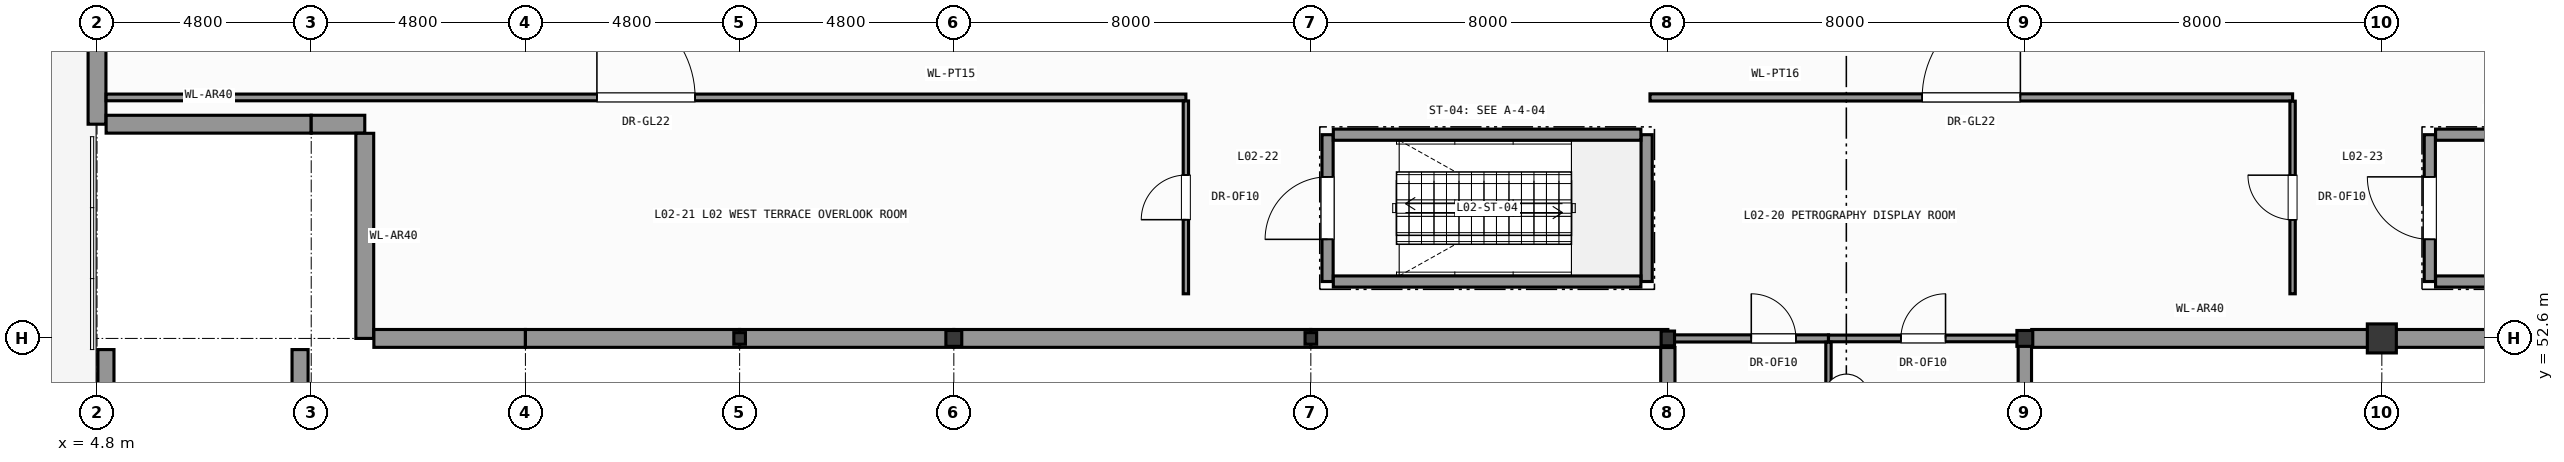
"""IFC4 building model, lengths in metres.
Left out: names, types, materials, properties, quantities, classifications, styles, units other than length and angle.
Written with IfcOpenShell. Run it as: python <this file> out.ifc"""

import sys

from ifc_helpers import new_model, si_unit, direction, frame, frame_2d, origin, origin_2d, place, context, subcontext, project, spatial, rectangle, hollow_rectangle, hollow_circle, i_section, extrude, element, fill, save


model = new_model("IFC4")
c1 = context("Model", 3, precision=1e-05, world=origin(), true_north=direction((0.0, 1.0)))
c2 = subcontext(c1, "Body", "Model", "MODEL_VIEW")
j1 = project(units=[si_unit("LENGTHUNIT", "METRE"), si_unit("PLANEANGLEUNIT", "RADIAN")], contexts=[c1])
p1 = place(None, origin())
s1 = spatial("IfcSite", under=j1, at=p1, CompositionType="ELEMENT")
p2 = place(p1, origin())
s2 = spatial("IfcBuilding", under=s1, at=p2, CompositionType="ELEMENT")
p3 = place(p2, frame((0.0, 0.0, 7.8)))
s3 = spatial("IfcBuildingStorey", under=s2, at=p3, CompositionType="ELEMENT", Elevation=7.8)
p4 = place(p3, frame((19.2, 52.6, 0.0), z_axis=(0.0, 0.0, 1.0), x_axis=(1.0, 0.0, 0.0)))
e1 = element("IfcColumn", 1, at=p4, inside=s3, PredefinedType="COLUMN", context=c2, shape_type="SweptSolid", body=[
    extrude(hollow_rectangle(XDim=0.26, YDim=0.26, WallThickness=0.012, InnerFilletRadius=0.012, OuterFilletRadius=0.025, at=origin_2d()), origin(), (0.0, 0.0, 1.0), 5.4),
])
p5 = place(p3, frame((24.0, 52.6, 0.0), z_axis=(0.0, 0.0, 1.0), x_axis=(1.0, 0.0, 0.0)))
e2 = element("IfcColumn", 2, at=p5, inside=s3, PredefinedType="COLUMN", context=c2, shape_type="SweptSolid", body=[
    extrude(hollow_circle(Radius=0.178, WallThickness=0.016, at=origin_2d()), origin(), (0.0, 0.0, 1.0), 5.4),
])
p6 = place(p3, frame((32.0, 52.6, 0.0), z_axis=(0.0, 0.0, 1.0), x_axis=(1.0, 0.0, 0.0)))
e3 = element("IfcColumn", 3, at=p6, inside=s3, PredefinedType="COLUMN", context=c2, shape_type="SweptSolid", body=[
    extrude(hollow_rectangle(XDim=0.26, YDim=0.26, WallThickness=0.012, InnerFilletRadius=0.012, OuterFilletRadius=0.025, at=origin_2d()), origin(), (0.0, 0.0, 1.0), 5.4),
])
p7 = place(p3, frame((40.0, 52.6, 0.0), z_axis=(0.0, 0.0, 1.0), x_axis=(1.0, 0.0, 0.0)))
e4 = element("IfcColumn", 4, at=p7, inside=s3, PredefinedType="COLUMN", context=c2, shape_type="SweptSolid", body=[
    extrude(i_section(OverallWidth=0.3, OverallDepth=0.33, WebThickness=0.01, FlangeThickness=0.017, FilletRadius=0.027, at=origin_2d()), origin(), (0.0, 0.0, 1.0), 5.4),
])
p8 = place(p3, frame((48.0, 52.6, 0.0), z_axis=(0.0, 0.0, 1.0), x_axis=(1.0, 0.0, 0.0)))
e5 = element("IfcColumn", 5, at=p8, inside=s3, PredefinedType="COLUMN", context=c2, shape_type="SweptSolid", body=[
    extrude(hollow_circle(Radius=0.178, WallThickness=0.016, at=origin_2d()), origin(), (0.0, 0.0, 1.0), 5.4),
])
p9 = place(p3, frame((56.0, 52.6, 0.0), z_axis=(0.0, 0.0, 1.0), x_axis=(1.0, 0.0, 0.0)))
e6 = element("IfcColumn", 6, at=p9, inside=s3, PredefinedType="PILASTER", context=c2, shape_type="SweptSolid", body=[
    extrude(rectangle(XDim=0.65, YDim=0.65, at=origin_2d()), origin(), (0.0, 0.0, 1.0), 5.4),
])
p10 = place(p3, frame((48.0, 52.6, 0.0), z_axis=(0.0, 0.0, 1.0), x_axis=(0.0, -1.0, 0.0)))
e7 = element("IfcWall", 7, at=p10, inside=s3, PredefinedType="SOLIDWALL", context=c2, shape_type="SweptSolid", body=[
    extrude(rectangle(XDim=7.0, YDim=0.3, at=frame_2d((3.5, 0.0))), origin(), (0.0, 0.0, 1.0), 4.635),
])
p11 = place(p10, frame((1.658, 0.0, 0.95)))
e8 = element("IfcOpeningElement", 8, at=p11, cuts=e7, PredefinedType="OPENING", context=c2, shape_type="SweptSolid", body=[
    extrude(rectangle(XDim=1.35, YDim=2.45, at=frame_2d((0.675, 1.225))), frame((0.0, 0.16, 0.0), z_axis=(0.0, -1.0, 0.0), x_axis=(1.0, 0.0, 0.0)), (0.0, 0.0, 1.0), 0.32),
])
p12 = place(p10, frame((3.992, 0.0, 0.95)))
e9 = element("IfcOpeningElement", 9, at=p12, cuts=e7, PredefinedType="OPENING", context=c2, shape_type="SweptSolid", body=[
    extrude(rectangle(XDim=1.35, YDim=2.45, at=frame_2d((0.675, 1.225))), frame((0.0, 0.16, 0.0), z_axis=(0.0, -1.0, 0.0), x_axis=(1.0, 0.0, 0.0)), (0.0, 0.0, 1.0), 0.32),
])
p13 = place(p3, frame((56.0, 52.6, 0.0), z_axis=(0.0, 0.0, 1.0), x_axis=(-1.0, 0.0, 0.0)))
e10 = element("IfcWall", 10, at=p13, inside=s3, PredefinedType="SOLIDWALL", context=c2, shape_type="SweptSolid", body=[
    extrude(rectangle(XDim=7.846, YDim=0.4, at=frame_2d((3.923, 0.0))), origin(), (0.0, 0.0, 1.0), 5.15),
])
p14 = place(p3, frame((70.0, 52.6, 0.0), z_axis=(0.0, 0.0, 1.0), x_axis=(-1.0, 0.0, 0.0)))
e11 = element("IfcWall", 11, at=p14, inside=s3, PredefinedType="SOLIDWALL", context=c2, shape_type="SweptSolid", body=[
    extrude(rectangle(XDim=14.0, YDim=0.4, at=frame_2d((7.0, 0.0))), origin(), (0.0, 0.0, 1.0), 5.15),
])
p15 = place(p3, frame((4.8, 57.4, 0.0), z_axis=(0.0, 0.0, 1.0), x_axis=(0.0, 1.0, 0.0)))
e12 = element("IfcWall", 12, at=p15, inside=s3, PredefinedType="SOLIDWALL", context=c2, shape_type="SweptSolid", body=[
    extrude(rectangle(XDim=2.2, YDim=0.4, at=frame_2d((1.1, 0.0))), origin(), (0.0, 0.0, 1.0), 5.15),
])
p16 = place(p3, frame((9.6, 57.4, 0.0), z_axis=(0.0, 0.0, 1.0), x_axis=(-1.0, 0.0, 0.0)))
e13 = element("IfcWall", 13, at=p16, inside=s3, PredefinedType="SOLIDWALL", context=c2, shape_type="SweptSolid", body=[
    extrude(rectangle(XDim=4.596, YDim=0.4, at=frame_2d((2.298, 0.0))), origin(), (0.0, 0.0, 1.0), 5.15),
])
p17 = place(p3, frame((10.8, 57.4, 0.0), z_axis=(0.0, 0.0, 1.0), x_axis=(-1.0, 0.0, 0.0)))
e14 = element("IfcWall", 14, at=p17, inside=s3, PredefinedType="SOLIDWALL", context=c2, shape_type="SweptSolid", body=[
    extrude(rectangle(XDim=1.2, YDim=0.4, at=frame_2d((0.6, 0.0))), origin(), (0.0, 0.0, 1.0), 5.15),
])
p18 = place(p3, frame((10.8, 52.6, 0.0), z_axis=(0.0, 0.0, 1.0), x_axis=(0.0, 1.0, 0.0)))
e15 = element("IfcWall", 15, at=p18, inside=s3, PredefinedType="SOLIDWALL", context=c2, shape_type="SweptSolid", body=[
    extrude(rectangle(XDim=4.596, YDim=0.4, at=frame_2d((2.298, 0.0))), origin(), (0.0, 0.0, 1.0), 5.15),
])
p19 = place(p3, frame((14.4, 52.6, 0.0), z_axis=(0.0, 0.0, 1.0), x_axis=(-1.0, 0.0, 0.0)))
e16 = element("IfcWall", 16, at=p19, inside=s3, PredefinedType="SOLIDWALL", context=c2, shape_type="SweptSolid", body=[
    extrude(rectangle(XDim=3.396, YDim=0.4, at=frame_2d((1.698, 0.0))), origin(), (0.0, 0.0, 1.0), 5.15),
])
for number, where, z_axis, x_axis in (
    (17, (19.2, 52.6, 0.0), (0.0, 0.0, 1.0), (-1.0, 0.0, 0.0)),
    (18, (24.0, 52.6, 0.0), (0.0, 0.0, 1.0), (-1.0, 0.0, 0.0)),
):
    element("IfcWall", number, at=place(p3, frame(where, z_axis=z_axis, x_axis=x_axis)), inside=s3, PredefinedType="SOLIDWALL", context=c2, shape_type="SweptSolid", body=[
        extrude(rectangle(XDim=4.8, YDim=0.4, at=frame_2d((2.4, 0.0))), origin(), (0.0, 0.0, 1.0), 5.15),
    ])
for number, where, z_axis, x_axis in (
    (19, (32.0, 52.6, 0.0), (0.0, 0.0, 1.0), (-1.0, 0.0, 0.0)),
    (20, (40.0, 52.6, 0.0), (0.0, 0.0, 1.0), (-1.0, 0.0, 0.0)),
):
    element("IfcWall", number, at=place(p3, frame(where, z_axis=z_axis, x_axis=x_axis)), inside=s3, PredefinedType="SOLIDWALL", context=c2, shape_type="SweptSolid", body=[
        extrude(rectangle(XDim=8.0, YDim=0.4, at=frame_2d((4.0, 0.0))), origin(), (0.0, 0.0, 1.0), 5.15),
    ])
p20 = place(p3, frame((40.0, 45.6, 0.0), z_axis=(0.0, 0.0, 1.0), x_axis=(0.0, 1.0, 0.0)))
e21 = element("IfcWall", 21, at=p20, inside=s3, PredefinedType="SOLIDWALL", context=c2, shape_type="SweptSolid", body=[
    extrude(rectangle(XDim=6.796, YDim=0.32, at=frame_2d((3.398, 0.0))), origin(), (0.0, 0.0, 1.0), 4.635),
])
p21 = place(p20, frame((2.373, 0.0, 0.95)))
e22 = element("IfcOpeningElement", 22, at=p21, cuts=e21, PredefinedType="OPENING", context=c2, shape_type="SweptSolid", body=[
    extrude(rectangle(XDim=2.05, YDim=3.29, at=frame_2d((1.025, 1.645))), frame((0.0, 0.17, 0.0), z_axis=(0.0, -1.0, 0.0), x_axis=(1.0, 0.0, 0.0)), (0.0, 0.0, 1.0), 0.34),
])
for number, where, z_axis, x_axis in (
    (23, (5.0, 29.91, -7.8), (0.0, 0.0, 1.0), (0.0, 1.0, 0.0)),
    (24, (9.35, 29.91, -7.8), (0.0, 0.0, 1.0), (0.0, 1.0, 0.0)),
):
    element("IfcWall", number, at=place(p3, frame(where, z_axis=z_axis, x_axis=x_axis)), inside=s3, PredefinedType="SOLIDWALL", context=c2, shape_type="SweptSolid", body=[
        extrude(rectangle(XDim=22.44, YDim=0.36, at=frame_2d((11.22, 0.0))), origin(), (0.0, 0.0, 1.0), 12.98),
    ])
p22 = place(p2, frame((0.0, 0.0, 13.2)))
s4 = spatial("IfcBuildingStorey", under=s2, at=p22, CompositionType="ELEMENT", Elevation=13.2)
for number, where, z_axis, x_axis in (
    (25, (9.8, 41.46, -13.2), (0.0, 0.0, 1.0), (0.0, 1.0, 0.0)),
    (26, (14.15, 41.46, -13.2), (0.0, 0.0, 1.0), (0.0, 1.0, 0.0)),
):
    element("IfcWall", number, at=place(p22, frame(where, z_axis=z_axis, x_axis=x_axis)), inside=s4, PredefinedType="SOLIDWALL", context=c2, shape_type="SweptSolid", body=[
        extrude(rectangle(XDim=10.89, YDim=0.36, at=frame_2d((5.445, 0.0))), origin(), (0.0, 0.0, 1.0), 17.78),
    ])
p23 = place(p3, frame((57.075, 53.875, 0.0), z_axis=(0.0, 0.0, 1.0), x_axis=(0.0, 1.0, 0.0)))
e27 = element("IfcWall", 27, at=p23, inside=s3, PredefinedType="SHEAR", context=c2, shape_type="SweptSolid", body=[
    extrude(rectangle(XDim=3.29, YDim=0.25, at=frame_2d((1.645, 0.0))), origin(), (0.0, 0.0, 1.0), 5.15),
])
p24 = place(p23, frame((0.945, 0.0, 0.0)))
e28 = element("IfcOpeningElement", 28, at=p24, cuts=e27, PredefinedType="OPENING", context=c2, shape_type="SweptSolid", body=[
    extrude(rectangle(XDim=1.4, YDim=2.2, at=frame_2d((0.7, 1.1))), frame((0.0, 0.135, 0.0), z_axis=(0.0, -1.0, 0.0), x_axis=(1.0, 0.0, 0.0)), (0.0, 0.0, 1.0), 0.27),
])
for number, where, z_axis, x_axis in (
    (29, (57.204, 53.875, 0.0), (0.0, 0.0, 1.0), (1.0, 0.0, 0.0)),
    (30, (57.204, 57.165, 0.0), (0.0, 0.0, 1.0), (1.0, 0.0, 0.0)),
):
    element("IfcWall", number, at=place(p3, frame(where, z_axis=z_axis, x_axis=x_axis)), inside=s3, PredefinedType="SHEAR", context=c2, shape_type="SweptSolid", body=[
        extrude(rectangle(XDim=7.192, YDim=0.25, at=frame_2d((3.596, 0.0))), origin(), (0.0, 0.0, 1.0), 5.15),
    ])
p25 = place(p3, frame((32.375, 53.875, 0.0), z_axis=(0.0, 0.0, 1.0), x_axis=(0.0, 1.0, 0.0)))
e31 = element("IfcWall", 31, at=p25, inside=s3, PredefinedType="SHEAR", context=c2, shape_type="SweptSolid", body=[
    extrude(rectangle(XDim=3.29, YDim=0.25, at=frame_2d((1.645, 0.0))), origin(), (0.0, 0.0, 1.0), 5.15),
])
p26 = place(p25, frame((0.945, 0.0, 0.0)))
e32 = element("IfcOpeningElement", 32, at=p26, cuts=e31, PredefinedType="OPENING", context=c2, shape_type="SweptSolid", body=[
    extrude(rectangle(XDim=1.4, YDim=2.2, at=frame_2d((0.7, 1.1))), frame((0.0, 0.135, 0.0), z_axis=(0.0, -1.0, 0.0), x_axis=(1.0, 0.0, 0.0)), (0.0, 0.0, 1.0), 0.27),
])
p27 = place(p3, frame((39.525, 53.875, 0.0), z_axis=(0.0, 0.0, 1.0), x_axis=(0.0, 1.0, 0.0)))
e33 = element("IfcWall", 33, at=p27, inside=s3, PredefinedType="SHEAR", context=c2, shape_type="SweptSolid", body=[
    extrude(rectangle(XDim=3.29, YDim=0.25, at=frame_2d((1.645, 0.0))), origin(), (0.0, 0.0, 1.0), 5.15),
])
for number, where, z_axis, x_axis in (
    (34, (32.504, 53.875, 0.0), (0.0, 0.0, 1.0), (1.0, 0.0, 0.0)),
    (35, (32.504, 57.165, 0.0), (0.0, 0.0, 1.0), (1.0, 0.0, 0.0)),
):
    element("IfcWall", number, at=place(p3, frame(where, z_axis=z_axis, x_axis=x_axis)), inside=s3, PredefinedType="SHEAR", context=c2, shape_type="SweptSolid", body=[
        extrude(rectangle(XDim=6.892, YDim=0.25, at=frame_2d((3.446, 0.0))), origin(), (0.0, 0.0, 1.0), 5.15),
    ])
p28 = place(p3, frame((39.6, 58.0, 0.0), z_axis=(0.0, 0.0, 1.0), x_axis=(1.0, 0.0, 0.0)))
e36 = element("IfcWall", 36, at=p28, inside=s3, PredefinedType="PARTITIONING", context=c2, shape_type="SweptSolid", body=[
    extrude(rectangle(XDim=14.4, YDim=0.16, at=frame_2d((7.2, 0.0))), origin(), (0.0, 0.0, 1.0), 5.15),
])
p29 = place(p28, frame((6.1, 0.0, 0.0)))
e37 = element("IfcOpeningElement", 37, at=p29, cuts=e36, PredefinedType="OPENING", context=c2, shape_type="SweptSolid", body=[
    extrude(rectangle(XDim=2.2, YDim=2.6, at=frame_2d((1.1, 1.3))), frame((0.0, 0.09, 0.0), z_axis=(0.0, -1.0, 0.0), x_axis=(1.0, 0.0, 0.0)), (0.0, 0.0, 1.0), 0.18),
])
p30 = place(p3, frame((5.004, 58.0, 0.0), z_axis=(0.0, 0.0, 1.0), x_axis=(1.0, 0.0, 0.0)))
e38 = element("IfcWall", 38, at=p30, inside=s3, PredefinedType="PARTITIONING", context=c2, shape_type="SweptSolid", body=[
    extrude(rectangle(XDim=24.196, YDim=0.15, at=frame_2d((12.098, 0.0))), origin(), (0.0, 0.0, 1.0), 5.15),
])
p31 = place(p30, frame((10.998, 0.0, 0.0)))
e39 = element("IfcOpeningElement", 39, at=p31, cuts=e38, PredefinedType="OPENING", context=c2, shape_type="SweptSolid", body=[
    extrude(rectangle(XDim=2.2, YDim=2.6, at=frame_2d((1.1, 1.3))), frame((0.0, 0.085, 0.0), z_axis=(0.0, -1.0, 0.0), x_axis=(1.0, 0.0, 0.0)), (0.0, 0.0, 1.0), 0.17),
])
p32 = place(p3, frame((54.0, 53.6, 0.0), z_axis=(0.0, 0.0, 1.0), x_axis=(0.0, 1.0, 0.0)))
e40 = element("IfcWall", 40, at=p32, inside=s3, PredefinedType="PARTITIONING", context=c2, shape_type="SweptSolid", body=[
    extrude(rectangle(XDim=4.316, YDim=0.12, at=frame_2d((2.158, 0.0))), origin(), (0.0, 0.0, 1.0), 5.15),
])
p33 = place(p32, frame((1.658, 0.0, 0.0)))
e41 = element("IfcOpeningElement", 41, at=p33, cuts=e40, PredefinedType="OPENING", context=c2, shape_type="SweptSolid", body=[
    extrude(rectangle(XDim=1.0, YDim=2.15, at=frame_2d((0.5, 1.075))), frame((0.0, 0.07, 0.0), z_axis=(0.0, -1.0, 0.0), x_axis=(1.0, 0.0, 0.0)), (0.0, 0.0, 1.0), 0.14),
])
p34 = place(p3, frame((40.0, 52.6, 0.0), z_axis=(0.0, 0.0, 1.0), x_axis=(1.0, 0.0, 0.0)))
e42 = element("IfcWall", 42, at=p34, inside=s3, PredefinedType="PARTITIONING", context=c2, shape_type="SweptSolid", body=[
    extrude(rectangle(XDim=3.6, YDim=0.16, at=frame_2d((1.8, 0.0))), origin(), (0.0, 0.0, 1.0), 4.735),
])
p35 = place(p34, frame((1.87, 0.0, 0.0)))
e43 = element("IfcOpeningElement", 43, at=p35, cuts=e42, PredefinedType="OPENING", context=c2, shape_type="SweptSolid", body=[
    extrude(rectangle(XDim=1.0, YDim=2.15, at=frame_2d((0.5, 1.075))), frame((0.0, 0.09, 0.0), z_axis=(0.0, -1.0, 0.0), x_axis=(1.0, 0.0, 0.0)), (0.0, 0.0, 1.0), 0.18),
])
p36 = place(p3, frame((43.6, 52.6, 0.0), z_axis=(0.0, 0.0, 1.0), x_axis=(1.0, 0.0, 0.0)))
e44 = element("IfcWall", 44, at=p36, inside=s3, PredefinedType="PARTITIONING", context=c2, shape_type="SweptSolid", body=[
    extrude(rectangle(XDim=4.246, YDim=0.15, at=frame_2d((2.123, 0.0))), origin(), (0.0, 0.0, 1.0), 4.735),
])
p37 = place(p36, frame((1.623, 0.0, 0.0)))
e45 = element("IfcOpeningElement", 45, at=p37, cuts=e44, PredefinedType="OPENING", context=c2, shape_type="SweptSolid", body=[
    extrude(rectangle(XDim=1.0, YDim=2.15, at=frame_2d((0.5, 1.075))), frame((0.0, 0.085, 0.0), z_axis=(0.0, -1.0, 0.0), x_axis=(1.0, 0.0, 0.0)), (0.0, 0.0, 1.0), 0.17),
])
p38 = place(p3, frame((29.2, 53.6, 0.0), z_axis=(0.0, 0.0, 1.0), x_axis=(0.0, 1.0, 0.0)))
e46 = element("IfcWall", 46, at=p38, inside=s3, PredefinedType="PARTITIONING", context=c2, shape_type="SweptSolid", body=[
    extrude(rectangle(XDim=4.321, YDim=0.12, at=frame_2d((2.16, 0.0))), origin(), (0.0, 0.0, 1.0), 5.15),
])
p39 = place(p38, frame((1.66, 0.0, 0.0)))
e47 = element("IfcOpeningElement", 47, at=p39, cuts=e46, PredefinedType="OPENING", context=c2, shape_type="SweptSolid", body=[
    extrude(rectangle(XDim=1.0, YDim=2.15, at=frame_2d((0.5, 1.075))), frame((0.0, 0.07, 0.0), z_axis=(0.0, -1.0, 0.0), x_axis=(1.0, 0.0, 0.0)), (0.0, 0.0, 1.0), 0.14),
])
p40 = place(p3, frame((43.6, 22.864, 0.0), z_axis=(0.0, 0.0, 1.0), x_axis=(0.0, 1.0, 0.0)))
e48 = element("IfcWall", 48, at=p40, inside=s3, PredefinedType="PARTITIONING", context=c2, shape_type="SweptSolid", body=[
    extrude(rectangle(XDim=29.652, YDim=0.12, at=frame_2d((14.826, 0.0))), origin(), (0.0, 0.0, 1.0), 5.15),
])
p41 = place(p40, frame((13.726, 0.0, 0.0)))
e49 = element("IfcOpeningElement", 49, at=p41, cuts=e48, PredefinedType="OPENING", context=c2, shape_type="SweptSolid", body=[
    extrude(rectangle(XDim=2.2, YDim=2.6, at=frame_2d((1.1, 1.3))), frame((0.0, 0.07, 0.0), z_axis=(0.0, -1.0, 0.0), x_axis=(1.0, 0.0, 0.0)), (0.0, 0.0, 1.0), 0.14),
])
p42 = place(p24, origin())
e50 = element("IfcDoor", 50, at=p42, inside=s3, OperationType="SINGLE_SWING_RIGHT", PredefinedType="DOOR", context=c2, shape_type="SweptSolid", body=[
    extrude(rectangle(XDim=1.4, YDim=2.2, at=frame_2d((0.7, 1.1))), frame((0.0, 0.025, 0.0), z_axis=(0.0, -1.0, 0.0), x_axis=(1.0, 0.0, 0.0)), (0.0, 0.0, 1.0), 0.05),
])
fill(e28, e50)
p43 = place(p26, origin())
e51 = element("IfcDoor", 51, at=p43, inside=s3, OperationType="SINGLE_SWING_LEFT", PredefinedType="DOOR", context=c2, shape_type="SweptSolid", body=[
    extrude(rectangle(XDim=1.4, YDim=2.2, at=frame_2d((0.7, 1.1))), frame((0.0, 0.025, 0.0), z_axis=(0.0, -1.0, 0.0), x_axis=(1.0, 0.0, 0.0)), (0.0, 0.0, 1.0), 0.05),
])
fill(e32, e51)
p44 = place(p29, origin())
e52 = element("IfcDoor", 52, at=p44, inside=s3, OperationType="SINGLE_SWING_RIGHT", PredefinedType="DOOR", context=c2, shape_type="SweptSolid", body=[
    extrude(rectangle(XDim=2.2, YDim=2.6, at=frame_2d((1.1, 1.3))), frame((0.0, 0.025, 0.0), z_axis=(0.0, -1.0, 0.0), x_axis=(1.0, 0.0, 0.0)), (0.0, 0.0, 1.0), 0.05),
])
fill(e37, e52)
p45 = place(p31, origin())
e53 = element("IfcDoor", 53, at=p45, inside=s3, OperationType="SINGLE_SWING_LEFT", PredefinedType="DOOR", context=c2, shape_type="SweptSolid", body=[
    extrude(rectangle(XDim=2.2, YDim=2.6, at=frame_2d((1.1, 1.3))), frame((0.0, 0.025, 0.0), z_axis=(0.0, -1.0, 0.0), x_axis=(1.0, 0.0, 0.0)), (0.0, 0.0, 1.0), 0.05),
])
fill(e39, e53)
p46 = place(p33, origin())
e54 = element("IfcDoor", 54, at=p46, inside=s3, OperationType="SINGLE_SWING_RIGHT", PredefinedType="DOOR", context=c2, shape_type="SweptSolid", body=[
    extrude(rectangle(XDim=1.0, YDim=2.15, at=frame_2d((0.5, 1.075))), frame((0.0, 0.025, 0.0), z_axis=(0.0, -1.0, 0.0), x_axis=(1.0, 0.0, 0.0)), (0.0, 0.0, 1.0), 0.05),
])
fill(e41, e54)
p47 = place(p35, origin())
e55 = element("IfcDoor", 55, at=p47, inside=s3, OperationType="SINGLE_SWING_LEFT", PredefinedType="DOOR", context=c2, shape_type="SweptSolid", body=[
    extrude(rectangle(XDim=1.0, YDim=2.15, at=frame_2d((0.5, 1.075))), frame((0.0, 0.025, 0.0), z_axis=(0.0, -1.0, 0.0), x_axis=(1.0, 0.0, 0.0)), (0.0, 0.0, 1.0), 0.05),
])
fill(e43, e55)
p48 = place(p37, origin())
e56 = element("IfcDoor", 56, at=p48, inside=s3, OperationType="SINGLE_SWING_RIGHT", PredefinedType="DOOR", context=c2, shape_type="SweptSolid", body=[
    extrude(rectangle(XDim=1.0, YDim=2.15, at=frame_2d((0.5, 1.075))), frame((0.0, 0.025, 0.0), z_axis=(0.0, -1.0, 0.0), x_axis=(1.0, 0.0, 0.0)), (0.0, 0.0, 1.0), 0.05),
])
fill(e45, e56)
p49 = place(p39, origin())
e57 = element("IfcDoor", 57, at=p49, inside=s3, OperationType="SINGLE_SWING_LEFT", PredefinedType="DOOR", context=c2, shape_type="SweptSolid", body=[
    extrude(rectangle(XDim=1.0, YDim=2.15, at=frame_2d((0.5, 1.075))), frame((0.0, 0.025, 0.0), z_axis=(0.0, -1.0, 0.0), x_axis=(1.0, 0.0, 0.0)), (0.0, 0.0, 1.0), 0.05),
])
fill(e47, e57)
save(model, sys.argv[1])
